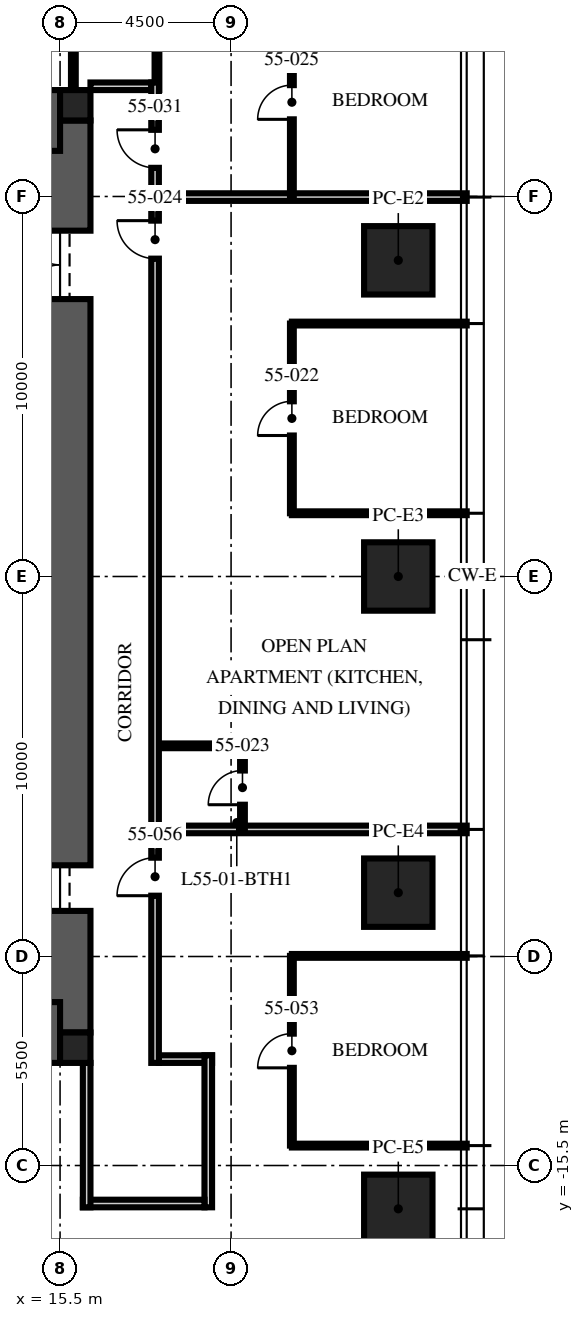
"""IFC4 building model, lengths in metres.
Left out: names, types, materials, properties, quantities, classifications, styles, units other than length and angle.
Written with IfcOpenShell. Run it as: python <this file> out.ifc"""

import sys

from ifc_helpers import new_model, si_unit, direction, frame, frame_2d, origin, origin_2d, place, context, subcontext, project, spatial, rectangle, extrude, element, fill, save


model = new_model("IFC4")
c1 = context("Model", 3, precision=1e-05, world=origin(), true_north=direction((0.0, 1.0)))
c2 = subcontext(c1, "Body", "Model", "MODEL_VIEW")
j1 = project(units=[si_unit("LENGTHUNIT", "METRE"), si_unit("PLANEANGLEUNIT", "RADIAN")], contexts=[c1])
p1 = place(None, origin())
s1 = spatial("IfcSite", under=j1, at=p1, CompositionType="ELEMENT")
p2 = place(p1, origin())
s2 = spatial("IfcBuilding", under=s1, at=p2, CompositionType="ELEMENT")
p3 = place(p2, frame((0.0, 0.0, 222.0)))
s3 = spatial("IfcBuildingStorey", under=s2, at=p3, CompositionType="ELEMENT", Elevation=222.0)
p4 = place(p3, frame((15.5, -12.0, -0.25), z_axis=(0.0, 0.0, 1.0), x_axis=(0.0, 1.0, 0.0)))
e1 = element("IfcWall", 1, at=p4, inside=s3, PredefinedType="SHEAR", context=c2, shape_type="SweptSolid", body=[
    extrude(rectangle(XDim=24.0, YDim=1.6, at=frame_2d((12.0, 0.0))), origin(), (0.0, 0.0, 1.0), 3.75),
])
p5 = place(p4, frame((3.2, 0.0, 0.25)))
e2 = element("IfcOpeningElement", 2, at=p5, cuts=e1, PredefinedType="OPENING", context=c2, shape_type="SweptSolid", body=[
    extrude(rectangle(XDim=1.2, YDim=2.1, at=frame_2d((0.6, 1.05))), frame((0.0, 0.81, 0.0), z_axis=(0.0, -1.0, 0.0), x_axis=(1.0, 0.0, 0.0)), (0.0, 0.0, 1.0), 1.62),
])
p6 = place(p4, frame((19.3, 0.0, 0.25)))
e3 = element("IfcOpeningElement", 3, at=p6, cuts=e1, PredefinedType="OPENING", context=c2, shape_type="SweptSolid", body=[
    extrude(rectangle(XDim=1.8, YDim=2.1, at=frame_2d((0.9, 1.05))), frame((0.0, 0.81, 0.0), z_axis=(0.0, -1.0, 0.0), x_axis=(1.0, 0.0, 0.0)), (0.0, 0.0, 1.0), 1.62),
])
for number, where, z_axis, x_axis in (
    (4, (-15.5, 12.0, -0.25), (0.0, 0.0, 1.0), (1.0, 0.0, 0.0)),
    (5, (-15.5, -12.0, -0.25), (0.0, 0.0, 1.0), (1.0, 0.0, 0.0)),
):
    element("IfcWall", number, at=place(p3, frame(where, z_axis=z_axis, x_axis=x_axis)), inside=s3, PredefinedType="SHEAR", context=c2, shape_type="SweptSolid", body=[
        extrude(rectangle(XDim=31.0, YDim=1.6, at=frame_2d((15.5, 0.0))), origin(), (0.0, 0.0, 1.0), 3.75),
    ])
for number, where, z_axis, x_axis in (
    (6, (15.9, 12.4, -0.25), (0.0, 0.0, 1.0), (1.0, 0.0, 0.0)),
    (7, (15.9, -12.4, -0.25), (0.0, 0.0, 1.0), (1.0, 0.0, 0.0)),
):
    element("IfcColumn", number, at=place(p3, frame(where, z_axis=z_axis, x_axis=x_axis)), inside=s3, PredefinedType="COLUMN", context=c2, shape_type="SweptSolid", body=[
        extrude(rectangle(XDim=0.8, YDim=0.8, at=origin_2d()), origin(), (0.0, 0.0, 1.0), 3.75),
    ])
for number, where, z_axis, x_axis in (
    (8, (24.4, 8.32, 0.0), (0.0, 0.0, 1.0), (0.0, 1.0, 0.0)),
    (9, (24.4, 0.0, 0.0), (0.0, 0.0, 1.0), (0.0, 1.0, 0.0)),
    (10, (24.4, -8.32, 0.0), (0.0, 0.0, 1.0), (0.0, 1.0, 0.0)),
    (11, (24.4, -16.64, 0.0), (0.0, 0.0, 1.0), (0.0, 1.0, 0.0)),
):
    element("IfcColumn", number, at=place(p3, frame(where, z_axis=z_axis, x_axis=x_axis)), inside=s3, PredefinedType="COLUMN", context=c2, shape_type="SweptSolid", body=[
        extrude(rectangle(XDim=1.8, YDim=1.8, at=origin_2d()), origin(), (0.0, 0.0, 1.0), 3.75),
    ])
p7 = place(p3, frame((18.1, -12.7, 0.0), z_axis=(0.0, 0.0, 1.0), x_axis=(1.0, 0.0, 0.0)))
e12 = element("IfcWall", 12, at=p7, inside=s3, PredefinedType="PARTITIONING", context=c2, shape_type="SweptSolid", body=[
    extrude(rectangle(XDim=1.4, YDim=0.2, at=frame_2d((0.7, 0.0))), origin(), (0.0, 0.0, 1.0), 2.81),
])
p8 = place(p3, frame((19.4, -12.6, 0.0), z_axis=(0.0, 0.0, 1.0), x_axis=(0.0, -1.0, 0.0)))
e13 = element("IfcWall", 13, at=p8, inside=s3, PredefinedType="PARTITIONING", context=c2, shape_type="SweptSolid", body=[
    extrude(rectangle(XDim=4.0, YDim=0.2, at=frame_2d((2.0, 0.0))), origin(), (0.0, 0.0, 1.0), 2.6),
])
p9 = place(p3, frame((19.3, -16.5, 0.0), z_axis=(0.0, 0.0, 1.0), x_axis=(-1.0, 0.0, 0.0)))
e14 = element("IfcWall", 14, at=p9, inside=s3, PredefinedType="PARTITIONING", context=c2, shape_type="SweptSolid", body=[
    extrude(rectangle(XDim=3.2, YDim=0.2, at=frame_2d((1.6, 0.0))), origin(), (0.0, 0.0, 1.0), 2.3),
])
p10 = place(p3, frame((16.2, -16.6, 0.0), z_axis=(0.0, 0.0, 1.0), x_axis=(0.0, 1.0, 0.0)))
e15 = element("IfcWall", 15, at=p10, inside=s3, PredefinedType="PARTITIONING", context=c2, shape_type="SweptSolid", body=[
    extrude(rectangle(XDim=3.8, YDim=0.2, at=frame_2d((1.9, 0.0))), origin(), (0.0, 0.0, 1.0), 2.3),
])
p11 = place(p3, frame((16.3, 12.9, 0.0), z_axis=(0.0, 0.0, 1.0), x_axis=(1.0, 0.0, 0.0)))
e16 = element("IfcWall", 16, at=p11, inside=s3, PredefinedType="PARTITIONING", context=c2, shape_type="SweptSolid", body=[
    extrude(rectangle(XDim=1.6, YDim=0.2, at=frame_2d((0.8, 0.0))), origin(), (0.0, 0.0, 1.0), 2.3),
])
p12 = place(p3, frame((18.1, -6.656, 0.0), z_axis=(0.0, 0.0, 1.0), x_axis=(1.0, 0.0, 0.0)))
e17 = element("IfcWall", 17, at=p12, inside=s3, PredefinedType="PARTITIONING", context=c2, shape_type="SweptSolid", body=[
    extrude(rectangle(XDim=8.1, YDim=0.2, at=frame_2d((4.05, 0.0))), origin(), (0.0, 0.0, 1.0), 2.91),
])
for number, where, z_axis, x_axis in (
    (18, (21.6, 1.664, 0.0), (0.0, 0.0, 1.0), (1.0, 0.0, 0.0)),
    (19, (21.6, 6.656, 0.0), (0.0, 0.0, 1.0), (1.0, 0.0, 0.0)),
):
    element("IfcWall", number, at=place(p3, frame(where, z_axis=z_axis, x_axis=x_axis)), inside=s3, PredefinedType="PARTITIONING", context=c2, shape_type="SweptSolid", body=[
        extrude(rectangle(XDim=4.6, YDim=0.1, at=frame_2d((2.3, 0.0))), origin(), (0.0, 0.0, 1.0), 2.91),
    ])
p13 = place(p3, frame((18.1, 9.984, 0.0), z_axis=(0.0, 0.0, 1.0), x_axis=(1.0, 0.0, 0.0)))
e20 = element("IfcWall", 20, at=p13, inside=s3, PredefinedType="PARTITIONING", context=c2, shape_type="SweptSolid", body=[
    extrude(rectangle(XDim=8.1, YDim=0.2, at=frame_2d((4.05, 0.0))), origin(), (0.0, 0.0, 1.0), 2.91),
])
for number, where, z_axis, x_axis in (
    (21, (21.6, -14.976, 0.0), (0.0, 0.0, 1.0), (1.0, 0.0, 0.0)),
    (22, (21.6, -9.984, 0.0), (0.0, 0.0, 1.0), (1.0, 0.0, 0.0)),
):
    element("IfcWall", number, at=place(p3, frame(where, z_axis=z_axis, x_axis=x_axis)), inside=s3, PredefinedType="PARTITIONING", context=c2, shape_type="SweptSolid", body=[
        extrude(rectangle(XDim=4.6, YDim=0.1, at=frame_2d((2.3, 0.0))), origin(), (0.0, 0.0, 1.0), 2.91),
    ])
p14 = place(p3, frame((21.6, 1.664, 0.0), z_axis=(0.0, 0.0, 1.0), x_axis=(0.0, 1.0, 0.0)))
e23 = element("IfcWall", 23, at=p14, inside=s3, PredefinedType="PARTITIONING", context=c2, shape_type="SweptSolid", body=[
    extrude(rectangle(XDim=4.992, YDim=0.1, at=frame_2d((2.496, 0.0))), origin(), (0.0, 0.0, 1.0), 2.81),
])
p15 = place(p14, frame((2.046, 0.0, 0.0)))
e24 = element("IfcOpeningElement", 24, at=p15, cuts=e23, PredefinedType="OPENING", context=c2, shape_type="SweptSolid", body=[
    extrude(rectangle(XDim=0.9, YDim=2.1, at=frame_2d((0.45, 1.05))), frame((0.0, 0.06, 0.0), z_axis=(0.0, -1.0, 0.0), x_axis=(1.0, 0.0, 0.0)), (0.0, 0.0, 1.0), 0.12),
])
p16 = place(p3, frame((20.3, -6.656, 0.0), z_axis=(0.0, 0.0, 1.0), x_axis=(0.0, 1.0, 0.0)))
e25 = element("IfcWall", 25, at=p16, inside=s3, PredefinedType="PARTITIONING", context=c2, shape_type="SweptSolid", body=[
    extrude(rectangle(XDim=2.2, YDim=0.125, at=frame_2d((1.1, 0.0))), origin(), (0.0, 0.0, 1.0), 3.5),
])
p17 = place(p16, frame((0.65, 0.0, 0.0)))
e26 = element("IfcOpeningElement", 26, at=p17, cuts=e25, PredefinedType="OPENING", context=c2, shape_type="SweptSolid", body=[
    extrude(rectangle(XDim=0.9, YDim=2.1, at=frame_2d((0.45, 1.05))), frame((0.0, 0.073, 0.0), z_axis=(0.0, -1.0, 0.0), x_axis=(1.0, 0.0, 0.0)), (0.0, 0.0, 1.0), 0.145),
])
p18 = place(p3, frame((18.1, -4.456, 0.0), z_axis=(0.0, 0.0, 1.0), x_axis=(1.0, 0.0, 0.0)))
e27 = element("IfcWall", 27, at=p18, inside=s3, PredefinedType="PARTITIONING", context=c2, shape_type="SweptSolid", body=[
    extrude(rectangle(XDim=2.2, YDim=0.125, at=frame_2d((1.1, 0.0))), origin(), (0.0, 0.0, 1.0), 3.5),
])
p19 = place(p3, frame((21.6, 9.984, 0.0), z_axis=(0.0, 0.0, 1.0), x_axis=(0.0, 1.0, 0.0)))
e28 = element("IfcWall", 28, at=p19, inside=s3, PredefinedType="PARTITIONING", context=c2, shape_type="SweptSolid", body=[
    extrude(rectangle(XDim=4.992, YDim=0.1, at=frame_2d((2.496, 0.0))), origin(), (0.0, 0.0, 1.0), 2.81),
])
p20 = place(p19, frame((2.046, 0.0, 0.0)))
e29 = element("IfcOpeningElement", 29, at=p20, cuts=e28, PredefinedType="OPENING", context=c2, shape_type="SweptSolid", body=[
    extrude(rectangle(XDim=0.9, YDim=2.1, at=frame_2d((0.45, 1.05))), frame((0.0, 0.06, 0.0), z_axis=(0.0, -1.0, 0.0), x_axis=(1.0, 0.0, 0.0)), (0.0, 0.0, 1.0), 0.12),
])
for number, where, z_axis, x_axis in (
    (30, (18.05, 12.8, 0.0), (0.0, 0.0, 1.0), (0.0, 1.0, 0.0)),
    (31, (15.85, 12.8, 0.0), (0.0, 0.0, 1.0), (0.0, 1.0, 0.0)),
):
    element("IfcWall", number, at=place(p3, frame(where, z_axis=z_axis, x_axis=x_axis)), inside=s3, PredefinedType="PARTITIONING", context=c2, shape_type="SweptSolid", body=[
        extrude(rectangle(XDim=2.8, YDim=0.125, at=frame_2d((1.4, 0.0))), origin(), (0.0, 0.0, 1.0), 2.3),
    ])
p21 = place(p3, frame((21.6, -14.976, 0.0), z_axis=(0.0, 0.0, 1.0), x_axis=(0.0, 1.0, 0.0)))
e32 = element("IfcWall", 32, at=p21, inside=s3, PredefinedType="PARTITIONING", context=c2, shape_type="SweptSolid", body=[
    extrude(rectangle(XDim=4.992, YDim=0.1, at=frame_2d((2.496, 0.0))), origin(), (0.0, 0.0, 1.0), 2.81),
])
p22 = place(p21, frame((2.046, 0.0, 0.0)))
e33 = element("IfcOpeningElement", 33, at=p22, cuts=e32, PredefinedType="OPENING", context=c2, shape_type="SweptSolid", body=[
    extrude(rectangle(XDim=0.9, YDim=2.1, at=frame_2d((0.45, 1.05))), frame((0.0, 0.06, 0.0), z_axis=(0.0, -1.0, 0.0), x_axis=(1.0, 0.0, 0.0)), (0.0, 0.0, 1.0), 0.12),
])
p23 = place(p3, frame((18.0, -12.8, 0.0), z_axis=(0.0, 0.0, 1.0), x_axis=(0.0, 1.0, 0.0)))
e34 = element("IfcWall", 34, at=p23, inside=s3, PredefinedType="PARTITIONING", context=c2, shape_type="SweptSolid", body=[
    extrude(rectangle(XDim=25.8, YDim=0.2, at=frame_2d((12.9, 0.0))), origin(), (0.0, 0.0, 1.0), 2.6),
])
p24 = place(p23, frame((21.164, 0.0, 0.0)))
e35 = element("IfcOpeningElement", 35, at=p24, cuts=e34, PredefinedType="OPENING", context=c2, shape_type="SweptSolid", body=[
    extrude(rectangle(XDim=1.0, YDim=2.2, at=frame_2d((0.5, 1.1))), frame((0.0, 0.11, 0.0), z_axis=(0.0, -1.0, 0.0), x_axis=(1.0, 0.0, 0.0)), (0.0, 0.0, 1.0), 0.22),
])
p25 = place(p23, frame((23.554, 0.0, 0.0)))
e36 = element("IfcOpeningElement", 36, at=p25, cuts=e34, PredefinedType="OPENING", context=c2, shape_type="SweptSolid", body=[
    extrude(rectangle(XDim=1.0, YDim=2.2, at=frame_2d((0.5, 1.1))), frame((0.0, 0.11, 0.0), z_axis=(0.0, -1.0, 0.0), x_axis=(1.0, 0.0, 0.0)), (0.0, 0.0, 1.0), 0.22),
])
p26 = place(p23, frame((4.4, 0.0, 0.0)))
e37 = element("IfcOpeningElement", 37, at=p26, cuts=e34, PredefinedType="OPENING", context=c2, shape_type="SweptSolid", body=[
    extrude(rectangle(XDim=1.0, YDim=2.2, at=frame_2d((0.5, 1.1))), frame((0.0, 0.11, 0.0), z_axis=(0.0, -1.0, 0.0), x_axis=(1.0, 0.0, 0.0)), (0.0, 0.0, 1.0), 0.22),
])
p27 = place(p5, origin())
e38 = element("IfcDoor", 38, at=p27, inside=s3, OperationType="SINGLE_SWING_LEFT", PredefinedType="DOOR", context=c2, shape_type="SweptSolid", body=[
    extrude(rectangle(XDim=1.2, YDim=2.1, at=frame_2d((0.6, 1.05))), frame((0.0, 0.025, 0.0), z_axis=(0.0, -1.0, 0.0), x_axis=(1.0, 0.0, 0.0)), (0.0, 0.0, 1.0), 0.05),
])
fill(e2, e38)
p28 = place(p6, origin())
e39 = element("IfcDoor", 39, at=p28, inside=s3, OperationType="DOUBLE_DOOR_SINGLE_SWING", PredefinedType="DOOR", context=c2, shape_type="SweptSolid", body=[
    extrude(rectangle(XDim=1.8, YDim=2.1, at=frame_2d((0.9, 1.05))), frame((0.0, 0.025, 0.0), z_axis=(0.0, -1.0, 0.0), x_axis=(1.0, 0.0, 0.0)), (0.0, 0.0, 1.0), 0.05),
])
fill(e3, e39)
p29 = place(p15, origin())
e40 = element("IfcDoor", 40, at=p29, inside=s3, OperationType="SINGLE_SWING_LEFT", PredefinedType="DOOR", context=c2, shape_type="SweptSolid", body=[
    extrude(rectangle(XDim=0.9, YDim=2.1, at=frame_2d((0.45, 1.05))), frame((0.0, 0.025, 0.0), z_axis=(0.0, -1.0, 0.0), x_axis=(1.0, 0.0, 0.0)), (0.0, 0.0, 1.0), 0.05),
])
fill(e24, e40)
p30 = place(p17, origin())
e41 = element("IfcDoor", 41, at=p30, inside=s3, OperationType="SINGLE_SWING_LEFT", PredefinedType="DOOR", context=c2, shape_type="SweptSolid", body=[
    extrude(rectangle(XDim=0.9, YDim=2.1, at=frame_2d((0.45, 1.05))), frame((0.0, 0.025, 0.0), z_axis=(0.0, -1.0, 0.0), x_axis=(1.0, 0.0, 0.0)), (0.0, 0.0, 1.0), 0.05),
])
fill(e26, e41)
p31 = place(p24, origin())
e42 = element("IfcDoor", 42, at=p31, inside=s3, OperationType="SINGLE_SWING_RIGHT", PredefinedType="DOOR", context=c2, shape_type="SweptSolid", body=[
    extrude(rectangle(XDim=1.0, YDim=2.2, at=frame_2d((0.5, 1.1))), frame((0.0, 0.025, 0.0), z_axis=(0.0, -1.0, 0.0), x_axis=(1.0, 0.0, 0.0)), (0.0, 0.0, 1.0), 0.05),
])
fill(e35, e42)
p32 = place(p20, origin())
e43 = element("IfcDoor", 43, at=p32, inside=s3, OperationType="SINGLE_SWING_LEFT", PredefinedType="DOOR", context=c2, shape_type="SweptSolid", body=[
    extrude(rectangle(XDim=0.9, YDim=2.1, at=frame_2d((0.45, 1.05))), frame((0.0, 0.025, 0.0), z_axis=(0.0, -1.0, 0.0), x_axis=(1.0, 0.0, 0.0)), (0.0, 0.0, 1.0), 0.05),
])
fill(e29, e43)
p33 = place(p25, origin())
e44 = element("IfcDoor", 44, at=p33, inside=s3, OperationType="SINGLE_SWING_RIGHT", PredefinedType="DOOR", context=c2, shape_type="SweptSolid", body=[
    extrude(rectangle(XDim=1.0, YDim=2.2, at=frame_2d((0.5, 1.1))), frame((0.0, 0.025, 0.0), z_axis=(0.0, -1.0, 0.0), x_axis=(1.0, 0.0, 0.0)), (0.0, 0.0, 1.0), 0.05),
])
fill(e36, e44)
p34 = place(p22, origin())
e45 = element("IfcDoor", 45, at=p34, inside=s3, OperationType="SINGLE_SWING_LEFT", PredefinedType="DOOR", context=c2, shape_type="SweptSolid", body=[
    extrude(rectangle(XDim=0.9, YDim=2.1, at=frame_2d((0.45, 1.05))), frame((0.0, 0.025, 0.0), z_axis=(0.0, -1.0, 0.0), x_axis=(1.0, 0.0, 0.0)), (0.0, 0.0, 1.0), 0.05),
])
fill(e33, e45)
p35 = place(p26, origin())
e46 = element("IfcDoor", 46, at=p35, inside=s3, OperationType="SINGLE_SWING_LEFT", PredefinedType="DOOR", context=c2, shape_type="SweptSolid", body=[
    extrude(rectangle(XDim=1.0, YDim=2.2, at=frame_2d((0.5, 1.1))), frame((0.0, 0.025, 0.0), z_axis=(0.0, -1.0, 0.0), x_axis=(1.0, 0.0, 0.0)), (0.0, 0.0, 1.0), 0.05),
])
fill(e37, e46)
save(model, sys.argv[1])
